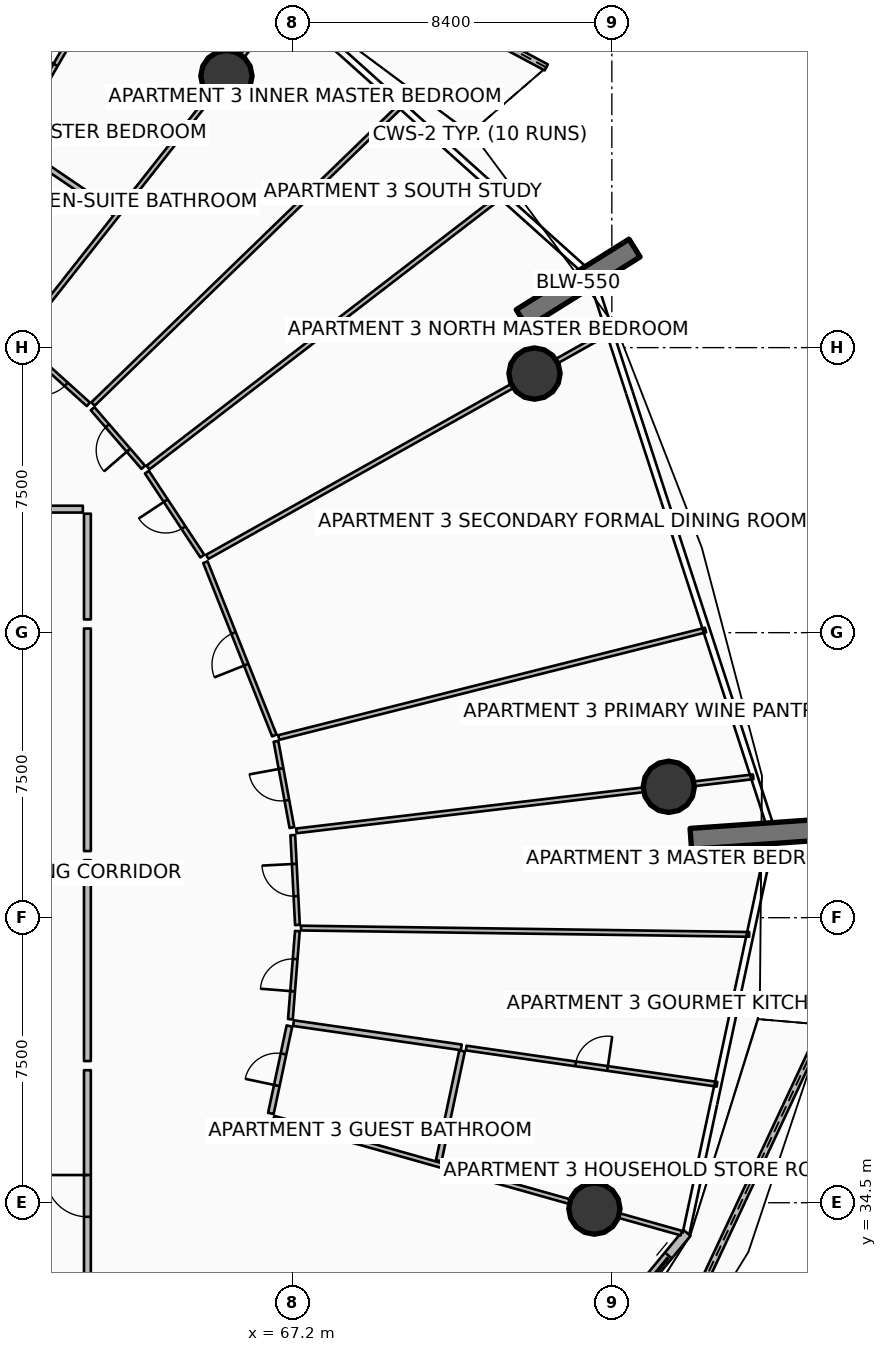
"""IFC4 building model, lengths in metres.
Left out: names, types, materials, properties, quantities, classifications, styles, units other than length and angle.
Written with IfcOpenShell. Run it as: python <this file> out.ifc"""

import sys

from ifc_helpers import new_model, si_unit, direction, frame, frame_2d, origin, origin_2d, place, context, subcontext, project, spatial, polyline, rectangle, circle, outline, extrude, element, fill, save


model = new_model("IFC4")
c1 = context("Model", 3, precision=1e-05, world=origin(), true_north=direction((0.0, 1.0)))
c2 = subcontext(c1, "Body", "Model", "MODEL_VIEW")
j1 = project(units=[si_unit("LENGTHUNIT", "METRE"), si_unit("PLANEANGLEUNIT", "RADIAN")], contexts=[c1])
p1 = place(None, origin())
s1 = spatial("IfcSite", under=j1, at=p1, CompositionType="ELEMENT")
p2 = place(p1, origin())
s2 = spatial("IfcBuilding", under=s1, at=p2, CompositionType="ELEMENT")
p3 = place(p2, frame((0.0, 0.0, 45.15)))
s3 = spatial("IfcBuildingStorey", under=s2, at=p3, CompositionType="ELEMENT", Elevation=45.15)
for number, where, z_axis, x_axis in (
    (1, (73.23, 57.765, 0.0), (0.0, 0.0, 1.0), (0.848, 0.53, 0.0)),
    (2, (77.678, 44.075, 0.0), (0.0, 0.0, 1.0), (0.998, 0.07, 0.0)),
):
    element("IfcWall", number, at=place(p3, frame(where, z_axis=z_axis, x_axis=x_axis)), inside=s3, PredefinedType="SOLIDWALL", context=c2, shape_type="SweptSolid", body=[
        extrude(rectangle(XDim=3.5, YDim=0.55, at=frame_2d((1.75, 0.0))), origin(), (0.0, 0.0, 1.0), 3.75),
    ])
for number, where, z_axis, x_axis in (
    (3, (73.565, 56.317, 0.0), (0.0, 0.0, 1.0), (1.0, 0.0, 0.0)),
    (4, (65.458, 64.146, 0.0), (0.0, 0.0, 1.0), (1.0, 0.0, 0.0)),
    (5, (75.141, 34.345, 0.0), (0.0, 0.0, 1.0), (1.0, 0.0, 0.0)),
    (6, (77.098, 45.444, 0.0), (0.0, 0.0, 1.0), (1.0, 0.0, 0.0)),
):
    element("IfcColumn", number, at=place(p3, frame(where, z_axis=z_axis, x_axis=x_axis)), inside=s3, PredefinedType="COLUMN", context=c2, shape_type="SweptSolid", body=[
        extrude(circle(Radius=0.675, at=origin_2d()), origin(), (0.0, 0.0, 1.0), 3.5),
    ])
p4 = place(p3, frame((73.874, 64.373, 0.0), z_axis=(0.0, 0.0, 1.0), x_axis=(-0.881385944807, 0.472396884301, 0.0)))
e7 = element("IfcWall", 7, at=p4, inside=s3, PredefinedType="PARAPET", context=c2, shape_type="SweptSolid", body=[
    extrude(outline(polyline([(0.0, 0.0), (12.779, 0.0), (12.779, 1.632), (6.39, 1.798), (0.0, 1.86), (0.0, 0.0)])), frame((0.0, 0.09, 0.0), z_axis=(0.0, -1.0, 0.0), x_axis=(1.0, 0.0, 0.0)), (0.0, 0.0, 1.0), 0.18),
])
p5 = place(p3, frame((75.912, 27.913, 0.0), z_axis=(0.0, 0.0, 1.0), x_axis=(0.424187605295, 0.905574334615, 0.0)))
e8 = element("IfcWall", 8, at=p5, inside=s3, PredefinedType="PARAPET", context=c2, shape_type="SweptSolid", body=[
    extrude(outline(polyline([(0.0, 0.0), (12.446, 0.0), (12.446, 1.224), (6.223, 1.127), (0.0, 1.148), (0.0, 0.0)])), frame((0.0, 0.09, 0.0), z_axis=(0.0, -1.0, 0.0), x_axis=(1.0, 0.0, 0.0)), (0.0, 0.0, 1.0), 0.18),
])
p6 = place(p3, frame((70.033, 24.567, 0.0), z_axis=(0.0, 0.0, 1.0), x_axis=(0.636674332663, 0.771132799281, 0.0)))
e9 = element("IfcWall", 9, at=p6, inside=s3, PredefinedType="SOLIDWALL", context=c2, shape_type="SweptSolid", body=[
    extrude(rectangle(XDim=11.851, YDim=0.24, at=frame_2d((5.926, 0.0))), origin(), (0.0, 0.0, 1.0), 2.45),
])
p7 = place(p6, frame((9.631, 0.0, 0.0)))
e10 = element("IfcOpeningElement", 10, at=p7, cuts=e9, PredefinedType="OPENING", context=c2, shape_type="SweptSolid", body=[
    extrude(rectangle(XDim=1.45, YDim=2.15, at=frame_2d((0.725, 1.075))), frame((0.0, 0.13, 0.0), z_axis=(0.0, -1.0, 0.0), x_axis=(1.0, 0.0, 0.0)), (0.0, 0.0, 1.0), 0.26),
])
p8 = place(p6, frame((0.28, 0.0, 0.65)))
e11 = element("IfcOpeningElement", 11, at=p8, cuts=e9, PredefinedType="OPENING", context=c2, shape_type="SweptSolid", body=[
    extrude(rectangle(XDim=1.6, YDim=1.5, at=frame_2d((0.8, 0.75))), frame((0.0, 0.13, 0.0), z_axis=(0.0, -1.0, 0.0), x_axis=(1.0, 0.0, 0.0)), (0.0, 0.0, 1.0), 0.26),
])
p9 = place(p3, frame((61.8, 31.37, 0.0), z_axis=(0.0, 0.0, 1.0), x_axis=(0.0, 1.0, 0.0)))
e12 = element("IfcWall", 12, at=p9, inside=s3, PredefinedType="PARTITIONING", context=c2, shape_type="SweptSolid", body=[
    extrude(rectangle(XDim=6.618, YDim=0.18, at=frame_2d((3.309, 0.0))), origin(), (0.0, 0.0, 1.0), 2.867),
])
p10 = place(p9, frame((2.759, 0.0, 0.0)))
e13 = element("IfcOpeningElement", 13, at=p10, cuts=e12, PredefinedType="OPENING", context=c2, shape_type="SweptSolid", body=[
    extrude(rectangle(XDim=1.1, YDim=2.1, at=frame_2d((0.55, 1.05))), frame((0.0, 0.1, 0.0), z_axis=(0.0, -1.0, 0.0), x_axis=(1.0, 0.0, 0.0)), (0.0, 0.0, 1.0), 0.2),
])
p11 = place(p3, frame((61.8, 38.228, 0.0), z_axis=(0.0, 0.0, 1.0), x_axis=(0.0, 1.0, 0.0)))
e14 = element("IfcWall", 14, at=p11, inside=s3, PredefinedType="PARTITIONING", context=c2, shape_type="SweptSolid", body=[
    extrude(rectangle(XDim=5.285, YDim=0.18, at=frame_2d((2.643, 0.0))), origin(), (0.0, 0.0, 1.0), 2.867),
])
p12 = place(p3, frame((66.703, 36.725, 0.0), z_axis=(0.0, 0.0, 1.0), x_axis=(0.962456868727, -0.271434662195, 0.0)))
e15 = element("IfcWall", 15, at=p12, inside=s3, PredefinedType="PARTITIONING", context=c2, shape_type="SweptSolid", body=[
    extrude(rectangle(XDim=11.141, YDim=0.125, at=frame_2d((5.571, 0.0))), origin(), (0.0, 0.0, 1.0), 2.867),
])
p13 = place(p3, frame((66.628, 36.85, 0.0), z_axis=(0.0, 0.0, 1.0), x_axis=(0.207543347309, 0.978225822082, 0.0)))
e16 = element("IfcWall", 16, at=p13, inside=s3, PredefinedType="PARTITIONING", context=c2, shape_type="SweptSolid", body=[
    extrude(rectangle(XDim=2.352, YDim=0.15, at=frame_2d((1.176, 0.0))), origin(), (0.0, 0.0, 1.0), 2.867),
])
p14 = place(p13, frame((0.751, 0.0, 0.0)))
e17 = element("IfcOpeningElement", 17, at=p14, cuts=e16, PredefinedType="OPENING", context=c2, shape_type="SweptSolid", body=[
    extrude(rectangle(XDim=0.85, YDim=2.06, at=frame_2d((0.425, 1.03))), frame((0.0, 0.085, 0.0), z_axis=(0.0, -1.0, 0.0), x_axis=(1.0, 0.0, 0.0)), (0.0, 0.0, 1.0), 0.17),
])
p15 = place(p3, frame((71.046, 35.604, 0.0), z_axis=(0.0, 0.0, 1.0), x_axis=(0.207542541756, 0.97822599299, 0.0)))
e18 = element("IfcWall", 18, at=p15, inside=s3, PredefinedType="PARTITIONING", context=c2, shape_type="SweptSolid", body=[
    extrude(rectangle(XDim=2.955, YDim=0.15, at=frame_2d((1.478, 0.0))), origin(), (0.0, 0.0, 1.0), 2.867),
])
p16 = place(p3, frame((67.224, 39.226, 0.0), z_axis=(0.0, 0.0, 1.0), x_axis=(0.989741519473, -0.142869607092, 0.0)))
e19 = element("IfcWall", 19, at=p16, inside=s3, PredefinedType="PARTITIONING", context=c2, shape_type="SweptSolid", body=[
    extrude(rectangle(XDim=4.46, YDim=0.15, at=frame_2d((2.23, 0.0))), origin(), (0.0, 0.0, 1.0), 2.94),
])
p17 = place(p3, frame((71.767, 38.57, 0.0), z_axis=(0.0, 0.0, 1.0), x_axis=(0.989747166196, -0.142830483468, 0.0)))
e20 = element("IfcWall", 20, at=p17, inside=s3, PredefinedType="PARTITIONING", context=c2, shape_type="SweptSolid", body=[
    extrude(rectangle(XDim=6.67, YDim=0.125, at=frame_2d((3.335, 0.0))), origin(), (0.0, 0.0, 1.0), 2.94),
])
p18 = place(p17, frame((2.91, 0.0, 0.0)))
e21 = element("IfcOpeningElement", 21, at=p18, cuts=e20, PredefinedType="OPENING", context=c2, shape_type="SweptSolid", body=[
    extrude(rectangle(XDim=0.85, YDim=2.06, at=frame_2d((0.425, 1.03))), frame((0.0, 0.073, 0.0), z_axis=(0.0, -1.0, 0.0), x_axis=(1.0, 0.0, 0.0)), (0.0, 0.0, 1.0), 0.145),
])
p19 = place(p3, frame((67.421, 41.727, 0.0), z_axis=(0.0, 0.0, 1.0), x_axis=(0.999900926594, -0.014076114402, 0.0)))
e22 = element("IfcWall", 22, at=p19, inside=s3, PredefinedType="PARTITIONING", context=c2, shape_type="SweptSolid", body=[
    extrude(rectangle(XDim=11.794, YDim=0.125, at=frame_2d((5.897, 0.0))), origin(), (0.0, 0.0, 1.0), 2.94),
])
p20 = place(p3, frame((67.142, 39.328, 0.0), z_axis=(0.0, 0.0, 1.0), x_axis=(0.078573538032, 0.996908320319, 0.0)))
e23 = element("IfcWall", 23, at=p20, inside=s3, PredefinedType="PARTITIONING", context=c2, shape_type="SweptSolid", body=[
    extrude(rectangle(XDim=2.327, YDim=0.125, at=frame_2d((1.164, 0.0))), origin(), (0.0, 0.0, 1.0), 2.94),
])
p21 = place(p20, frame((0.739, 0.0, 0.0)))
e24 = element("IfcOpeningElement", 24, at=p21, cuts=e23, PredefinedType="OPENING", context=c2, shape_type="SweptSolid", body=[
    extrude(rectangle(XDim=0.85, YDim=2.06, at=frame_2d((0.425, 1.03))), frame((0.0, 0.073, 0.0), z_axis=(0.0, -1.0, 0.0), x_axis=(1.0, 0.0, 0.0)), (0.0, 0.0, 1.0), 0.145),
])
p22 = place(p3, frame((67.327, 41.808, 0.0), z_axis=(0.0, 0.0, 1.0), x_axis=(-0.05186073985, 0.998654326412, 0.0)))
e25 = element("IfcWall", 25, at=p22, inside=s3, PredefinedType="PARTITIONING", context=c2, shape_type="SweptSolid", body=[
    extrude(rectangle(XDim=2.368, YDim=0.125, at=frame_2d((1.184, 0.0))), origin(), (0.0, 0.0, 1.0), 2.867),
])
p23 = place(p22, frame((0.759, 0.0, 0.0)))
e26 = element("IfcOpeningElement", 26, at=p23, cuts=e25, PredefinedType="OPENING", context=c2, shape_type="SweptSolid", body=[
    extrude(rectangle(XDim=0.85, YDim=2.06, at=frame_2d((0.425, 1.03))), frame((0.0, 0.073, 0.0), z_axis=(0.0, -1.0, 0.0), x_axis=(1.0, 0.0, 0.0)), (0.0, 0.0, 1.0), 0.145),
])
p24 = place(p3, frame((61.8, 43.753, 0.0), z_axis=(0.0, 0.0, 1.0), x_axis=(0.0, 1.0, 0.0)))
e27 = element("IfcWall", 27, at=p24, inside=s3, PredefinedType="PARTITIONING", context=c2, shape_type="SweptSolid", body=[
    extrude(rectangle(XDim=5.855, YDim=0.18, at=frame_2d((2.927, 0.0))), origin(), (0.0, 0.0, 1.0), 2.867),
])
p25 = place(p3, frame((67.298, 44.284, 0.0), z_axis=(0.0, 0.0, 1.0), x_axis=(0.993068589749, 0.117536275483, 0.0)))
e28 = element("IfcWall", 28, at=p25, inside=s3, PredefinedType="PARTITIONING", context=c2, shape_type="SweptSolid", body=[
    extrude(rectangle(XDim=12.106, YDim=0.125, at=frame_2d((6.053, 0.0))), origin(), (0.0, 0.0, 1.0), 2.867),
])
p26 = place(p3, frame((66.835, 46.742, 0.0), z_axis=(0.0, 0.0, 1.0), x_axis=(0.96974434054, 0.244122743698, 0.0)))
e29 = element("IfcWall", 29, at=p26, inside=s3, PredefinedType="PARTITIONING", context=c2, shape_type="SweptSolid", body=[
    extrude(rectangle(XDim=11.58, YDim=0.125, at=frame_2d((5.79, 0.0))), origin(), (0.0, 0.0, 1.0), 2.94),
])
p27 = place(p3, frame((67.181, 44.371, 0.0), z_axis=(0.0, 0.0, 1.0), x_axis=(-0.181165121265, 0.98345269273, 0.0)))
e30 = element("IfcWall", 30, at=p27, inside=s3, PredefinedType="PARTITIONING", context=c2, shape_type="SweptSolid", body=[
    extrude(rectangle(XDim=2.308, YDim=0.125, at=frame_2d((1.154, 0.0))), origin(), (0.0, 0.0, 1.0), 2.867),
])
p28 = place(p27, frame((0.729, 0.0, 0.0)))
e31 = element("IfcOpeningElement", 31, at=p28, cuts=e30, PredefinedType="OPENING", context=c2, shape_type="SweptSolid", body=[
    extrude(rectangle(XDim=0.85, YDim=2.06, at=frame_2d((0.425, 1.03))), frame((0.0, 0.073, 0.0), z_axis=(0.0, -1.0, 0.0), x_axis=(1.0, 0.0, 0.0)), (0.0, 0.0, 1.0), 0.145),
])
p29 = place(p3, frame((66.719, 46.794, 0.0), z_axis=(0.0, 0.0, 1.0), x_axis=(-0.369571376039, 0.929202345032, 0.0)))
e32 = element("IfcWall", 32, at=p29, inside=s3, PredefinedType="PARTITIONING", context=c2, shape_type="SweptSolid", body=[
    extrude(rectangle(XDim=4.907, YDim=0.125, at=frame_2d((2.454, 0.0))), origin(), (0.0, 0.0, 1.0), 2.867),
])
p30 = place(p29, frame((2.004, 0.0, 0.0)))
e33 = element("IfcOpeningElement", 33, at=p30, cuts=e32, PredefinedType="OPENING", context=c2, shape_type="SweptSolid", body=[
    extrude(rectangle(XDim=0.9, YDim=2.08, at=frame_2d((0.45, 1.04))), frame((0.0, 0.073, 0.0), z_axis=(0.0, -1.0, 0.0), x_axis=(1.0, 0.0, 0.0)), (0.0, 0.0, 1.0), 0.145),
])
p31 = place(p3, frame((61.8, 49.848, 0.0), z_axis=(0.0, 0.0, 1.0), x_axis=(0.0, 1.0, 0.0)))
e34 = element("IfcWall", 34, at=p31, inside=s3, PredefinedType="PARTITIONING", context=c2, shape_type="SweptSolid", body=[
    extrude(rectangle(XDim=2.781, YDim=0.18, at=frame_2d((1.391, 0.0))), origin(), (0.0, 0.0, 1.0), 2.867),
])
p32 = place(p3, frame((61.68, 52.75, 0.0), z_axis=(0.0, 0.0, 1.0), x_axis=(-1.0, 0.0, 0.0)))
e35 = element("IfcWall", 35, at=p32, inside=s3, PredefinedType="PARTITIONING", context=c2, shape_type="SweptSolid", body=[
    extrude(rectangle(XDim=5.085, YDim=0.18, at=frame_2d((2.543, 0.0))), origin(), (0.0, 0.0, 1.0), 2.867),
])
p33 = place(p3, frame((64.955, 51.495, 0.0), z_axis=(0.0, 0.0, 1.0), x_axis=(0.872499825659, 0.488614422857, 0.0)))
e36 = element("IfcWall", 36, at=p33, inside=s3, PredefinedType="PARTITIONING", context=c2, shape_type="SweptSolid", body=[
    extrude(rectangle(XDim=12.106, YDim=0.125, at=frame_2d((6.053, 0.0))), origin(), (0.0, 0.0, 1.0), 2.867),
])
p34 = place(p3, frame((63.394, 53.844, 0.0), z_axis=(0.0, 0.0, 1.0), x_axis=(0.792561224619, 0.609792345992, 0.0)))
e37 = element("IfcWall", 37, at=p34, inside=s3, PredefinedType="PARTITIONING", context=c2, shape_type="SweptSolid", body=[
    extrude(rectangle(XDim=11.714, YDim=0.125, at=frame_2d((5.857, 0.0))), origin(), (0.0, 0.0, 1.0), 2.94),
])
p35 = place(p3, frame((61.948, 55.517, 0.0), z_axis=(0.0, 0.0, 1.0), x_axis=(0.718127497198, 0.69591155887, 0.0)))
e38 = element("IfcWall", 38, at=p35, inside=s3, PredefinedType="PARTITIONING", context=c2, shape_type="SweptSolid", body=[
    extrude(rectangle(XDim=11.264, YDim=0.125, at=frame_2d((5.632, 0.0))), origin(), (0.0, 0.0, 1.0), 2.94),
])
p36 = place(p3, frame((64.824, 51.513, 0.0), z_axis=(0.0, 0.0, 1.0), x_axis=(-0.550627570513, 0.834751027906, 0.0)))
e39 = element("IfcWall", 39, at=p36, inside=s3, PredefinedType="PARTITIONING", context=c2, shape_type="SweptSolid", body=[
    extrude(rectangle(XDim=2.646, YDim=0.125, at=frame_2d((1.323, 0.0))), origin(), (0.0, 0.0, 1.0), 2.867),
])
p37 = place(p36, frame((0.898, 0.0, 0.0)))
e40 = element("IfcOpeningElement", 40, at=p37, cuts=e39, PredefinedType="OPENING", context=c2, shape_type="SweptSolid", body=[
    extrude(rectangle(XDim=0.85, YDim=2.06, at=frame_2d((0.425, 1.03))), frame((0.0, 0.073, 0.0), z_axis=(0.0, -1.0, 0.0), x_axis=(1.0, 0.0, 0.0)), (0.0, 0.0, 1.0), 0.145),
])
p38 = place(p3, frame((63.27, 53.85, 0.0), z_axis=(0.0, 0.0, 1.0), x_axis=(-0.653978023322, 0.756513545822, 0.0)))
e41 = element("IfcWall", 41, at=p38, inside=s3, PredefinedType="PARTITIONING", context=c2, shape_type="SweptSolid", body=[
    extrude(rectangle(XDim=2.041, YDim=0.125, at=frame_2d((1.02, 0.0))), origin(), (0.0, 0.0, 1.0), 2.94),
])
p39 = place(p38, frame((0.595, 0.0, 0.0)))
e42 = element("IfcOpeningElement", 42, at=p39, cuts=e41, PredefinedType="OPENING", context=c2, shape_type="SweptSolid", body=[
    extrude(rectangle(XDim=0.85, YDim=2.06, at=frame_2d((0.425, 1.03))), frame((0.0, 0.073, 0.0), z_axis=(0.0, -1.0, 0.0), x_axis=(1.0, 0.0, 0.0)), (0.0, 0.0, 1.0), 0.145),
])
p40 = place(p3, frame((61.824, 55.508, 0.0), z_axis=(0.0, 0.0, 1.0), x_axis=(-0.742309867555, 0.670056759185, 0.0)))
e43 = element("IfcWall", 43, at=p40, inside=s3, PredefinedType="PARTITIONING", context=c2, shape_type="SweptSolid", body=[
    extrude(rectangle(XDim=2.419, YDim=0.125, at=frame_2d((1.21, 0.0))), origin(), (0.0, 0.0, 1.0), 2.867),
])
p41 = place(p40, frame((0.785, 0.0, 0.0)))
e44 = element("IfcOpeningElement", 44, at=p41, cuts=e43, PredefinedType="OPENING", context=c2, shape_type="SweptSolid", body=[
    extrude(rectangle(XDim=0.85, YDim=2.06, at=frame_2d((0.425, 1.03))), frame((0.0, 0.073, 0.0), z_axis=(0.0, -1.0, 0.0), x_axis=(1.0, 0.0, 0.0)), (0.0, 0.0, 1.0), 0.145),
])
p42 = place(p3, frame((60.031, 57.261, 0.0), z_axis=(0.0, 0.0, 1.0), x_axis=(0.619090661436, 0.78531952282, 0.0)))
e45 = element("IfcWall", 45, at=p42, inside=s3, PredefinedType="PARTITIONING", context=c2, shape_type="SweptSolid", body=[
    extrude(rectangle(XDim=11.241, YDim=0.125, at=frame_2d((5.621, 0.0))), origin(), (0.0, 0.0, 1.0), 2.867),
])
p43 = place(p3, frame((62.499, 60.553, 0.0), z_axis=(0.0, 0.0, 1.0), x_axis=(-0.827754852397, 0.561089925354, 0.0)))
e46 = element("IfcWall", 46, at=p43, inside=s3, PredefinedType="PARTITIONING", context=c2, shape_type="SweptSolid", body=[
    extrude(rectangle(XDim=3.192, YDim=0.15, at=frame_2d((1.596, 0.0))), origin(), (0.0, 0.0, 1.0), 2.867),
])
p44 = place(p3, frame((59.827, 62.472, 0.0), z_axis=(0.0, 0.0, 1.0), x_axis=(0.500211191889, 0.865903437751, 0.0)))
e47 = element("IfcWall", 47, at=p44, inside=s3, PredefinedType="PARTITIONING", context=c2, shape_type="SweptSolid", body=[
    extrude(rectangle(XDim=5.39, YDim=0.125, at=frame_2d((2.695, 0.0))), origin(), (0.0, 0.0, 1.0), 2.94),
])
p45 = place(p44, frame((2.27, 0.0, 0.0)))
e48 = element("IfcOpeningElement", 48, at=p45, cuts=e47, PredefinedType="OPENING", context=c2, shape_type="SweptSolid", body=[
    extrude(rectangle(XDim=0.85, YDim=2.06, at=frame_2d((0.425, 1.03))), frame((0.0, 0.073, 0.0), z_axis=(0.0, -1.0, 0.0), x_axis=(1.0, 0.0, 0.0)), (0.0, 0.0, 1.0), 0.145),
])
p46 = place(p7, origin())
e49 = element("IfcDoor", 49, at=p46, inside=s3, OperationType="DOUBLE_DOOR_SLIDING", PredefinedType="DOOR", context=c2, shape_type="SweptSolid", body=[
    extrude(rectangle(XDim=1.45, YDim=2.15, at=frame_2d((0.725, 1.075))), frame((0.0, 0.025, 0.0), z_axis=(0.0, -1.0, 0.0), x_axis=(1.0, 0.0, 0.0)), (0.0, 0.0, 1.0), 0.05),
])
fill(e10, e49)
p47 = place(p10, origin())
e50 = element("IfcDoor", 50, at=p47, inside=s3, OperationType="SINGLE_SWING_RIGHT", PredefinedType="DOOR", context=c2, shape_type="SweptSolid", body=[
    extrude(rectangle(XDim=1.1, YDim=2.1, at=frame_2d((0.55, 1.05))), frame((0.0, 0.025, 0.0), z_axis=(0.0, -1.0, 0.0), x_axis=(1.0, 0.0, 0.0)), (0.0, 0.0, 1.0), 0.05),
])
fill(e13, e50)
p48 = place(p14, origin())
e51 = element("IfcDoor", 51, at=p48, inside=s3, OperationType="SINGLE_SWING_LEFT", PredefinedType="DOOR", context=c2, shape_type="SweptSolid", body=[
    extrude(rectangle(XDim=0.85, YDim=2.06, at=frame_2d((0.425, 1.03))), frame((0.0, 0.025, 0.0), z_axis=(0.0, -1.0, 0.0), x_axis=(1.0, 0.0, 0.0)), (0.0, 0.0, 1.0), 0.05),
])
fill(e17, e51)
p49 = place(p18, origin())
e52 = element("IfcDoor", 52, at=p49, inside=s3, OperationType="SINGLE_SWING_RIGHT", PredefinedType="DOOR", context=c2, shape_type="SweptSolid", body=[
    extrude(rectangle(XDim=0.85, YDim=2.06, at=frame_2d((0.425, 1.03))), frame((0.0, 0.025, 0.0), z_axis=(0.0, -1.0, 0.0), x_axis=(1.0, 0.0, 0.0)), (0.0, 0.0, 1.0), 0.05),
])
fill(e21, e52)
p50 = place(p21, origin())
e53 = element("IfcDoor", 53, at=p50, inside=s3, OperationType="SINGLE_SWING_LEFT", PredefinedType="DOOR", context=c2, shape_type="SweptSolid", body=[
    extrude(rectangle(XDim=0.85, YDim=2.06, at=frame_2d((0.425, 1.03))), frame((0.0, 0.025, 0.0), z_axis=(0.0, -1.0, 0.0), x_axis=(1.0, 0.0, 0.0)), (0.0, 0.0, 1.0), 0.05),
])
fill(e24, e53)
p51 = place(p23, origin())
e54 = element("IfcDoor", 54, at=p51, inside=s3, OperationType="SINGLE_SWING_RIGHT", PredefinedType="DOOR", context=c2, shape_type="SweptSolid", body=[
    extrude(rectangle(XDim=0.85, YDim=2.06, at=frame_2d((0.425, 1.03))), frame((0.0, 0.025, 0.0), z_axis=(0.0, -1.0, 0.0), x_axis=(1.0, 0.0, 0.0)), (0.0, 0.0, 1.0), 0.05),
])
fill(e26, e54)
p52 = place(p28, origin())
e55 = element("IfcDoor", 55, at=p52, inside=s3, OperationType="SINGLE_SWING_RIGHT", PredefinedType="DOOR", context=c2, shape_type="SweptSolid", body=[
    extrude(rectangle(XDim=0.85, YDim=2.06, at=frame_2d((0.425, 1.03))), frame((0.0, 0.025, 0.0), z_axis=(0.0, -1.0, 0.0), x_axis=(1.0, 0.0, 0.0)), (0.0, 0.0, 1.0), 0.05),
])
fill(e31, e55)
p53 = place(p30, origin())
e56 = element("IfcDoor", 56, at=p53, inside=s3, OperationType="SINGLE_SWING_LEFT", PredefinedType="DOOR", context=c2, shape_type="SweptSolid", body=[
    extrude(rectangle(XDim=0.9, YDim=2.08, at=frame_2d((0.45, 1.04))), frame((0.0, 0.025, 0.0), z_axis=(0.0, -1.0, 0.0), x_axis=(1.0, 0.0, 0.0)), (0.0, 0.0, 1.0), 0.05),
])
fill(e33, e56)
p54 = place(p37, origin())
e57 = element("IfcDoor", 57, at=p54, inside=s3, OperationType="SINGLE_SWING_RIGHT", PredefinedType="DOOR", context=c2, shape_type="SweptSolid", body=[
    extrude(rectangle(XDim=0.85, YDim=2.06, at=frame_2d((0.425, 1.03))), frame((0.0, 0.025, 0.0), z_axis=(0.0, -1.0, 0.0), x_axis=(1.0, 0.0, 0.0)), (0.0, 0.0, 1.0), 0.05),
])
fill(e40, e57)
p55 = place(p39, origin())
e58 = element("IfcDoor", 58, at=p55, inside=s3, OperationType="SINGLE_SWING_LEFT", PredefinedType="DOOR", context=c2, shape_type="SweptSolid", body=[
    extrude(rectangle(XDim=0.85, YDim=2.06, at=frame_2d((0.425, 1.03))), frame((0.0, 0.025, 0.0), z_axis=(0.0, -1.0, 0.0), x_axis=(1.0, 0.0, 0.0)), (0.0, 0.0, 1.0), 0.05),
])
fill(e42, e58)
p56 = place(p41, origin())
e59 = element("IfcDoor", 59, at=p56, inside=s3, OperationType="SINGLE_SWING_RIGHT", PredefinedType="DOOR", context=c2, shape_type="SweptSolid", body=[
    extrude(rectangle(XDim=0.85, YDim=2.06, at=frame_2d((0.425, 1.03))), frame((0.0, 0.025, 0.0), z_axis=(0.0, -1.0, 0.0), x_axis=(1.0, 0.0, 0.0)), (0.0, 0.0, 1.0), 0.05),
])
fill(e44, e59)
p57 = place(p45, origin())
e60 = element("IfcDoor", 60, at=p57, inside=s3, OperationType="SINGLE_SWING_LEFT", PredefinedType="DOOR", context=c2, shape_type="SweptSolid", body=[
    extrude(rectangle(XDim=0.85, YDim=2.06, at=frame_2d((0.425, 1.03))), frame((0.0, 0.025, 0.0), z_axis=(0.0, -1.0, 0.0), x_axis=(1.0, 0.0, 0.0)), (0.0, 0.0, 1.0), 0.05),
])
fill(e48, e60)
save(model, sys.argv[1])
